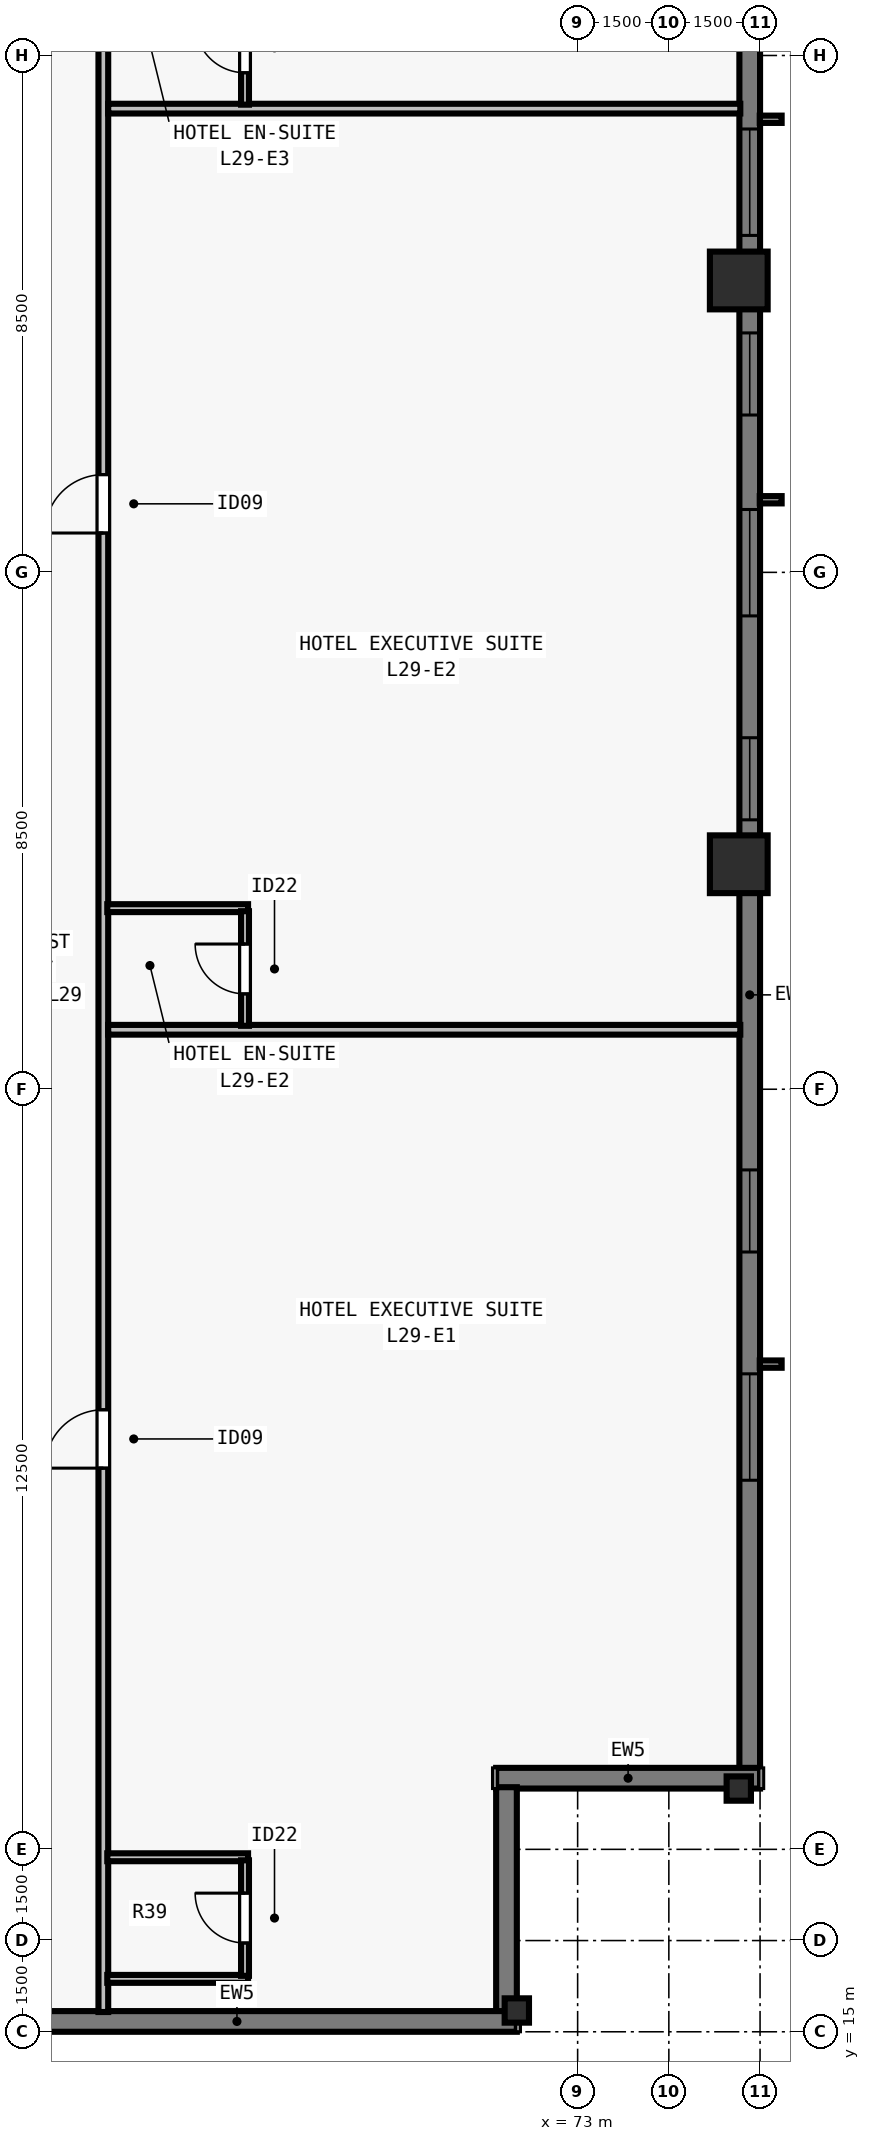
"""IFC4 building model, lengths in metres.
Left out: names, types, materials, properties, quantities, classifications, styles, units other than length and angle.
Written with IfcOpenShell. Run it as: python <this file> out.ifc"""

import sys

from ifc_helpers import new_model, si_unit, direction, frame, frame_2d, origin, origin_2d, place, context, subcontext, project, spatial, rectangle, i_section, extrude, element, fill, save


model = new_model("IFC4")
c1 = context("Model", 3, precision=1e-05, world=origin(), true_north=direction((0.0, 1.0)))
c2 = subcontext(c1, "Body", "Model", "MODEL_VIEW")
j1 = project(units=[si_unit("LENGTHUNIT", "METRE"), si_unit("PLANEANGLEUNIT", "RADIAN")], contexts=[c1])
p1 = place(None, origin())
s1 = spatial("IfcSite", under=j1, at=p1, CompositionType="ELEMENT")
p2 = place(p1, origin())
s2 = spatial("IfcBuilding", under=s1, at=p2, CompositionType="ELEMENT")
p3 = place(p2, frame((0.0, 0.0, 109.5)))
s3 = spatial("IfcBuildingStorey", under=s2, at=p3, CompositionType="ELEMENT", Elevation=109.5)
for number, where, z_axis, x_axis in (
    (1, (72.0, 15.35, 0.0), (0.0, 0.0, 1.0), (1.0, 0.0, 0.0)),
    (2, (75.65, 19.0, 0.0), (0.0, 0.0, 1.0), (0.0, 1.0, 0.0)),
):
    element("IfcColumn", number, at=place(p3, frame(where, z_axis=z_axis, x_axis=x_axis)), inside=s3, PredefinedType="COLUMN", context=c2, shape_type="SweptSolid", body=[
        extrude(i_section(OverallWidth=0.4, OverallDepth=0.4, WebThickness=0.022, FlangeThickness=0.036, at=origin_2d()), origin(), (0.0, 0.0, 1.0), 3.5),
    ])
for number, where, z_axis, x_axis in (
    (3, (75.65, 34.2, 0.0), (0.0, 0.0, 1.0), (0.0, 1.0, 0.0)),
    (4, (75.65, 43.8, 0.0), (0.0, 0.0, 1.0), (0.0, 1.0, 0.0)),
):
    element("IfcColumn", number, at=place(p3, frame(where, z_axis=z_axis, x_axis=x_axis)), inside=s3, PredefinedType="COLUMN", context=c2, shape_type="SweptSolid", body=[
        extrude(rectangle(XDim=0.95, YDim=0.95, at=origin_2d()), origin(), (0.0, 0.0, 1.0), 3.5),
    ])
p4 = place(p3, frame((75.83, 59.0, 0.0), z_axis=(0.0, 0.0, 1.0), x_axis=(0.0, -1.0, 0.0)))
e5 = element("IfcWall", 5, at=p4, inside=s3, PredefinedType="SOLIDWALL", context=c2, shape_type="SweptSolid", body=[
    extrude(rectangle(XDim=39.682, YDim=0.34, at=frame_2d((19.841, 0.0))), origin(), (0.0, 0.0, 1.0), 3.28),
])
p5 = place(p4, frame((4.752, 0.0, 0.8)))
e6 = element("IfcOpeningElement", 6, at=p5, cuts=e5, PredefinedType="OPENING", context=c2, shape_type="SweptSolid", body=[
    extrude(rectangle(XDim=1.75, YDim=1.66, at=frame_2d((0.875, 0.83))), frame((0.0, 0.18, 0.0), z_axis=(0.0, -1.0, 0.0), x_axis=(1.0, 0.0, 0.0)), (0.0, 0.0, 1.0), 0.36),
])
p6 = place(p4, frame((8.505, 0.0, 0.8)))
e7 = element("IfcOpeningElement", 7, at=p6, cuts=e5, PredefinedType="OPENING", context=c2, shape_type="SweptSolid", body=[
    extrude(rectangle(XDim=1.35, YDim=1.66, at=frame_2d((0.675, 0.83))), frame((0.0, 0.18, 0.0), z_axis=(0.0, -1.0, 0.0), x_axis=(1.0, 0.0, 0.0)), (0.0, 0.0, 1.0), 0.36),
])
p7 = place(p4, frame((12.709, 0.0, 0.8)))
e8 = element("IfcOpeningElement", 8, at=p7, cuts=e5, PredefinedType="OPENING", context=c2, shape_type="SweptSolid", body=[
    extrude(rectangle(XDim=1.75, YDim=1.66, at=frame_2d((0.875, 0.83))), frame((0.0, 0.18, 0.0), z_axis=(0.0, -1.0, 0.0), x_axis=(1.0, 0.0, 0.0)), (0.0, 0.0, 1.0), 0.36),
])
p8 = place(p4, frame((16.062, 0.0, 0.8)))
e9 = element("IfcOpeningElement", 9, at=p8, cuts=e5, PredefinedType="OPENING", context=c2, shape_type="SweptSolid", body=[
    extrude(rectangle(XDim=1.35, YDim=1.66, at=frame_2d((0.675, 0.83))), frame((0.0, 0.18, 0.0), z_axis=(0.0, -1.0, 0.0), x_axis=(1.0, 0.0, 0.0)), (0.0, 0.0, 1.0), 0.36),
])
p9 = place(p4, frame((18.966, 0.0, 0.8)))
e10 = element("IfcOpeningElement", 10, at=p9, cuts=e5, PredefinedType="OPENING", context=c2, shape_type="SweptSolid", body=[
    extrude(rectangle(XDim=1.75, YDim=1.66, at=frame_2d((0.875, 0.83))), frame((0.0, 0.18, 0.0), z_axis=(0.0, -1.0, 0.0), x_axis=(1.0, 0.0, 0.0)), (0.0, 0.0, 1.0), 0.36),
])
p10 = place(p4, frame((22.719, 0.0, 0.8)))
e11 = element("IfcOpeningElement", 11, at=p10, cuts=e5, PredefinedType="OPENING", context=c2, shape_type="SweptSolid", body=[
    extrude(rectangle(XDim=1.35, YDim=1.66, at=frame_2d((0.675, 0.83))), frame((0.0, 0.18, 0.0), z_axis=(0.0, -1.0, 0.0), x_axis=(1.0, 0.0, 0.0)), (0.0, 0.0, 1.0), 0.36),
])
p11 = place(p4, frame((29.827, 0.0, 0.8)))
e12 = element("IfcOpeningElement", 12, at=p11, cuts=e5, PredefinedType="OPENING", context=c2, shape_type="SweptSolid", body=[
    extrude(rectangle(XDim=1.35, YDim=1.66, at=frame_2d((0.675, 0.83))), frame((0.0, 0.18, 0.0), z_axis=(0.0, -1.0, 0.0), x_axis=(1.0, 0.0, 0.0)), (0.0, 0.0, 1.0), 0.36),
])
p12 = place(p4, frame((33.18, 0.0, 0.8)))
e13 = element("IfcOpeningElement", 13, at=p12, cuts=e5, PredefinedType="OPENING", context=c2, shape_type="SweptSolid", body=[
    extrude(rectangle(XDim=1.75, YDim=1.66, at=frame_2d((0.875, 0.83))), frame((0.0, 0.18, 0.0), z_axis=(0.0, -1.0, 0.0), x_axis=(1.0, 0.0, 0.0)), (0.0, 0.0, 1.0), 0.36),
])
p13 = place(p3, frame((76.0, 19.17, 0.0), z_axis=(0.0, 0.0, 1.0), x_axis=(-1.0, 0.0, 0.0)))
e14 = element("IfcWall", 14, at=p13, inside=s3, PredefinedType="SOLIDWALL", context=c2, shape_type="SweptSolid", body=[
    extrude(rectangle(XDim=4.34, YDim=0.34, at=frame_2d((2.17, 0.0))), origin(), (0.0, 0.0, 1.0), 3.28),
])
p14 = place(p3, frame((71.83, 19.022, 0.0), z_axis=(0.0, 0.0, 1.0), x_axis=(0.0, -1.0, 0.0)))
e15 = element("IfcWall", 15, at=p14, inside=s3, PredefinedType="SOLIDWALL", context=c2, shape_type="SweptSolid", body=[
    extrude(rectangle(XDim=3.704, YDim=0.34, at=frame_2d((1.852, 0.0))), origin(), (0.0, 0.0, 1.0), 3.28),
])
p15 = place(p3, frame((72.0, 15.17, 0.0), z_axis=(0.0, 0.0, 1.0), x_axis=(-1.0, 0.0, 0.0)))
e16 = element("IfcWall", 16, at=p15, inside=s3, PredefinedType="SOLIDWALL", context=c2, shape_type="SweptSolid", body=[
    extrude(rectangle(XDim=39.682, YDim=0.34, at=frame_2d((19.841, 0.0))), origin(), (0.0, 0.0, 1.0), 3.28),
])
p16 = place(p15, frame((9.355, 0.0, 0.8)))
e17 = element("IfcOpeningElement", 17, at=p16, cuts=e16, PredefinedType="OPENING", context=c2, shape_type="SweptSolid", body=[
    extrude(rectangle(XDim=1.35, YDim=1.66, at=frame_2d((0.675, 0.83))), frame((0.0, 0.18, 0.0), z_axis=(0.0, -1.0, 0.0), x_axis=(1.0, 0.0, 0.0)), (0.0, 0.0, 1.0), 0.36),
])
p17 = place(p15, frame((11.859, 0.0, 0.8)))
e18 = element("IfcOpeningElement", 18, at=p17, cuts=e16, PredefinedType="OPENING", context=c2, shape_type="SweptSolid", body=[
    extrude(rectangle(XDim=1.75, YDim=1.66, at=frame_2d((0.875, 0.83))), frame((0.0, 0.18, 0.0), z_axis=(0.0, -1.0, 0.0), x_axis=(1.0, 0.0, 0.0)), (0.0, 0.0, 1.0), 0.36),
])
p18 = place(p15, frame((16.062, 0.0, 0.8)))
e19 = element("IfcOpeningElement", 19, at=p18, cuts=e16, PredefinedType="OPENING", context=c2, shape_type="SweptSolid", body=[
    extrude(rectangle(XDim=1.35, YDim=1.66, at=frame_2d((0.675, 0.83))), frame((0.0, 0.18, 0.0), z_axis=(0.0, -1.0, 0.0), x_axis=(1.0, 0.0, 0.0)), (0.0, 0.0, 1.0), 0.36),
])
p19 = place(p15, frame((18.116, 0.0, 0.8)))
e20 = element("IfcOpeningElement", 20, at=p19, cuts=e16, PredefinedType="OPENING", context=c2, shape_type="SweptSolid", body=[
    extrude(rectangle(XDim=1.75, YDim=1.66, at=frame_2d((0.875, 0.83))), frame((0.0, 0.18, 0.0), z_axis=(0.0, -1.0, 0.0), x_axis=(1.0, 0.0, 0.0)), (0.0, 0.0, 1.0), 0.36),
])
p20 = place(p15, frame((22.719, 0.0, 0.8)))
e21 = element("IfcOpeningElement", 21, at=p20, cuts=e16, PredefinedType="OPENING", context=c2, shape_type="SweptSolid", body=[
    extrude(rectangle(XDim=1.35, YDim=1.66, at=frame_2d((0.675, 0.83))), frame((0.0, 0.18, 0.0), z_axis=(0.0, -1.0, 0.0), x_axis=(1.0, 0.0, 0.0)), (0.0, 0.0, 1.0), 0.36),
])
p21 = place(p15, frame((26.073, 0.0, 0.8)))
e22 = element("IfcOpeningElement", 22, at=p21, cuts=e16, PredefinedType="OPENING", context=c2, shape_type="SweptSolid", body=[
    extrude(rectangle(XDim=1.75, YDim=1.66, at=frame_2d((0.875, 0.83))), frame((0.0, 0.18, 0.0), z_axis=(0.0, -1.0, 0.0), x_axis=(1.0, 0.0, 0.0)), (0.0, 0.0, 1.0), 0.36),
])
p22 = place(p15, frame((29.377, 0.0, 0.8)))
e23 = element("IfcOpeningElement", 23, at=p22, cuts=e16, PredefinedType="OPENING", context=c2, shape_type="SweptSolid", body=[
    extrude(rectangle(XDim=1.35, YDim=1.66, at=frame_2d((0.675, 0.83))), frame((0.0, 0.18, 0.0), z_axis=(0.0, -1.0, 0.0), x_axis=(1.0, 0.0, 0.0)), (0.0, 0.0, 1.0), 0.36),
])
p23 = place(p3, frame((65.2, 15.325, 0.0), z_axis=(0.0, 0.0, 1.0), x_axis=(0.0, 1.0, 0.0)))
e24 = element("IfcWall", 24, at=p23, inside=s3, PredefinedType="PARTITIONING", context=c2, shape_type="SweptSolid", body=[
    extrude(rectangle(XDim=47.35, YDim=0.16, at=frame_2d((23.675, 0.0))), origin(), (0.0, 0.0, 1.0), 2.555),
])
p24 = place(p23, frame((8.944, 0.0, 0.0)))
e25 = element("IfcOpeningElement", 25, at=p24, cuts=e24, PredefinedType="OPENING", context=c2, shape_type="SweptSolid", body=[
    extrude(rectangle(XDim=0.96, YDim=2.15, at=frame_2d((0.48, 1.075))), frame((0.0, 0.09, 0.0), z_axis=(0.0, -1.0, 0.0), x_axis=(1.0, 0.0, 0.0)), (0.0, 0.0, 1.0), 0.18),
])
p25 = place(p23, frame((24.322, 0.0, 0.0)))
e26 = element("IfcOpeningElement", 26, at=p25, cuts=e24, PredefinedType="OPENING", context=c2, shape_type="SweptSolid", body=[
    extrude(rectangle(XDim=0.96, YDim=2.15, at=frame_2d((0.48, 1.075))), frame((0.0, 0.09, 0.0), z_axis=(0.0, -1.0, 0.0), x_axis=(1.0, 0.0, 0.0)), (0.0, 0.0, 1.0), 0.18),
])
p26 = place(p23, frame((39.873, 0.0, 0.0)))
e27 = element("IfcOpeningElement", 27, at=p26, cuts=e24, PredefinedType="OPENING", context=c2, shape_type="SweptSolid", body=[
    extrude(rectangle(XDim=0.96, YDim=2.15, at=frame_2d((0.48, 1.075))), frame((0.0, 0.09, 0.0), z_axis=(0.0, -1.0, 0.0), x_axis=(1.0, 0.0, 0.0)), (0.0, 0.0, 1.0), 0.18),
])
for number, where, z_axis, x_axis in (
    (28, (65.265, 15.87, 0.0), (0.0, 0.0, 1.0), (1.0, 0.0, 0.0)),
    (29, (65.265, 17.87, 0.0), (0.0, 0.0, 1.0), (1.0, 0.0, 0.0)),
):
    element("IfcWall", number, at=place(p3, frame(where, z_axis=z_axis, x_axis=x_axis)), inside=s3, PredefinedType="PLUMBINGWALL", context=c2, shape_type="SweptSolid", body=[
        extrude(rectangle(XDim=2.315, YDim=0.13, at=frame_2d((1.158, 0.0))), origin(), (0.0, 0.0, 1.0), 3.28),
    ])
p27 = place(p3, frame((67.53, 15.92, 0.0), z_axis=(0.0, 0.0, 1.0), x_axis=(0.0, 1.0, 0.0)))
e30 = element("IfcWall", 30, at=p27, inside=s3, PredefinedType="PLUMBINGWALL", context=c2, shape_type="SweptSolid", body=[
    extrude(rectangle(XDim=1.9, YDim=0.13, at=frame_2d((0.95, 0.0))), origin(), (0.0, 0.0, 1.0), 3.28),
])
p28 = place(p27, frame((0.54, 0.0, 0.0)))
e31 = element("IfcOpeningElement", 31, at=p28, cuts=e30, PredefinedType="OPENING", context=c2, shape_type="SweptSolid", body=[
    extrude(rectangle(XDim=0.82, YDim=2.1, at=frame_2d((0.41, 1.05))), frame((0.0, 0.075, 0.0), z_axis=(0.0, -1.0, 0.0), x_axis=(1.0, 0.0, 0.0)), (0.0, 0.0, 1.0), 0.15),
])
p29 = place(p3, frame((65.28, 31.478, 0.0), z_axis=(0.0, 0.0, 1.0), x_axis=(1.0, 0.0, 0.0)))
e32 = element("IfcWall", 32, at=p29, inside=s3, PredefinedType="PARTITIONING", context=c2, shape_type="SweptSolid", body=[
    extrude(rectangle(XDim=10.395, YDim=0.16, at=frame_2d((5.198, 0.0))), origin(), (0.0, 0.0, 1.0), 3.28),
])
p30 = place(p3, frame((65.265, 33.478, 0.0), z_axis=(0.0, 0.0, 1.0), x_axis=(1.0, 0.0, 0.0)))
e33 = element("IfcWall", 33, at=p30, inside=s3, PredefinedType="PLUMBINGWALL", context=c2, shape_type="SweptSolid", body=[
    extrude(rectangle(XDim=2.315, YDim=0.13, at=frame_2d((1.158, 0.0))), origin(), (0.0, 0.0, 1.0), 3.28),
])
p31 = place(p3, frame((67.53, 31.543, 0.0), z_axis=(0.0, 0.0, 1.0), x_axis=(0.0, 1.0, 0.0)))
e34 = element("IfcWall", 34, at=p31, inside=s3, PredefinedType="PLUMBINGWALL", context=c2, shape_type="SweptSolid", body=[
    extrude(rectangle(XDim=1.885, YDim=0.13, at=frame_2d((0.942, 0.0))), origin(), (0.0, 0.0, 1.0), 3.28),
])
p32 = place(p31, frame((0.525, 0.0, 0.0)))
e35 = element("IfcOpeningElement", 35, at=p32, cuts=e34, PredefinedType="OPENING", context=c2, shape_type="SweptSolid", body=[
    extrude(rectangle(XDim=0.82, YDim=2.1, at=frame_2d((0.41, 1.05))), frame((0.0, 0.075, 0.0), z_axis=(0.0, -1.0, 0.0), x_axis=(1.0, 0.0, 0.0)), (0.0, 0.0, 1.0), 0.15),
])
p33 = place(p3, frame((65.28, 46.626, 0.0), z_axis=(0.0, 0.0, 1.0), x_axis=(1.0, 0.0, 0.0)))
e36 = element("IfcWall", 36, at=p33, inside=s3, PredefinedType="PARTITIONING", context=c2, shape_type="SweptSolid", body=[
    extrude(rectangle(XDim=10.395, YDim=0.16, at=frame_2d((5.198, 0.0))), origin(), (0.0, 0.0, 1.0), 3.28),
])
p34 = place(p3, frame((67.53, 46.691, 0.0), z_axis=(0.0, 0.0, 1.0), x_axis=(0.0, 1.0, 0.0)))
e37 = element("IfcWall", 37, at=p34, inside=s3, PredefinedType="PLUMBINGWALL", context=c2, shape_type="SweptSolid", body=[
    extrude(rectangle(XDim=1.885, YDim=0.13, at=frame_2d((0.942, 0.0))), origin(), (0.0, 0.0, 1.0), 3.28),
])
p35 = place(p34, frame((0.525, 0.0, 0.0)))
e38 = element("IfcOpeningElement", 38, at=p35, cuts=e37, PredefinedType="OPENING", context=c2, shape_type="SweptSolid", body=[
    extrude(rectangle(XDim=0.82, YDim=2.1, at=frame_2d((0.41, 1.05))), frame((0.0, 0.075, 0.0), z_axis=(0.0, -1.0, 0.0), x_axis=(1.0, 0.0, 0.0)), (0.0, 0.0, 1.0), 0.15),
])
p36 = place(p7, origin())
e39 = element("IfcWindow", 39, at=p36, inside=s3, PartitioningType="SINGLE_PANEL", PredefinedType="WINDOW", context=c2, shape_type="SweptSolid", body=[
    extrude(rectangle(XDim=1.75, YDim=1.66, at=frame_2d((0.875, 0.83))), frame((0.0, -0.05, 0.0), z_axis=(0.0, -1.0, 0.0), x_axis=(1.0, 0.0, 0.0)), (0.0, 0.0, 1.0), 0.06),
])
fill(e8, e39)
p37 = place(p8, origin())
e40 = element("IfcWindow", 40, at=p37, inside=s3, PartitioningType="SINGLE_PANEL", PredefinedType="WINDOW", context=c2, shape_type="SweptSolid", body=[
    extrude(rectangle(XDim=1.35, YDim=1.66, at=frame_2d((0.675, 0.83))), frame((0.0, -0.05, 0.0), z_axis=(0.0, -1.0, 0.0), x_axis=(1.0, 0.0, 0.0)), (0.0, 0.0, 1.0), 0.06),
])
fill(e9, e40)
p38 = place(p9, origin())
e41 = element("IfcWindow", 41, at=p38, inside=s3, PartitioningType="SINGLE_PANEL", PredefinedType="WINDOW", context=c2, shape_type="SweptSolid", body=[
    extrude(rectangle(XDim=1.75, YDim=1.66, at=frame_2d((0.875, 0.83))), frame((0.0, -0.05, 0.0), z_axis=(0.0, -1.0, 0.0), x_axis=(1.0, 0.0, 0.0)), (0.0, 0.0, 1.0), 0.06),
])
fill(e10, e41)
p39 = place(p10, origin())
e42 = element("IfcWindow", 42, at=p39, inside=s3, PartitioningType="SINGLE_PANEL", PredefinedType="WINDOW", context=c2, shape_type="SweptSolid", body=[
    extrude(rectangle(XDim=1.35, YDim=1.66, at=frame_2d((0.675, 0.83))), frame((0.0, -0.05, 0.0), z_axis=(0.0, -1.0, 0.0), x_axis=(1.0, 0.0, 0.0)), (0.0, 0.0, 1.0), 0.06),
])
fill(e11, e42)
p40 = place(p11, origin())
e43 = element("IfcWindow", 43, at=p40, inside=s3, PartitioningType="SINGLE_PANEL", PredefinedType="WINDOW", context=c2, shape_type="SweptSolid", body=[
    extrude(rectangle(XDim=1.35, YDim=1.66, at=frame_2d((0.675, 0.83))), frame((0.0, -0.05, 0.0), z_axis=(0.0, -1.0, 0.0), x_axis=(1.0, 0.0, 0.0)), (0.0, 0.0, 1.0), 0.06),
])
fill(e12, e43)
p41 = place(p12, origin())
e44 = element("IfcWindow", 44, at=p41, inside=s3, PartitioningType="SINGLE_PANEL", PredefinedType="WINDOW", context=c2, shape_type="SweptSolid", body=[
    extrude(rectangle(XDim=1.75, YDim=1.66, at=frame_2d((0.875, 0.83))), frame((0.0, -0.05, 0.0), z_axis=(0.0, -1.0, 0.0), x_axis=(1.0, 0.0, 0.0)), (0.0, 0.0, 1.0), 0.06),
])
fill(e13, e44)
p42 = place(p28, origin())
e45 = element("IfcDoor", 45, at=p42, inside=s3, OperationType="SINGLE_SWING_RIGHT", PredefinedType="DOOR", context=c2, shape_type="SweptSolid", body=[
    extrude(rectangle(XDim=0.82, YDim=2.1, at=frame_2d((0.41, 1.05))), frame((0.0, 0.025, 0.0), z_axis=(0.0, -1.0, 0.0), x_axis=(1.0, 0.0, 0.0)), (0.0, 0.0, 1.0), 0.05),
])
fill(e31, e45)
p43 = place(p24, origin())
e46 = element("IfcDoor", 46, at=p43, inside=s3, OperationType="SINGLE_SWING_LEFT", PredefinedType="DOOR", context=c2, shape_type="SweptSolid", body=[
    extrude(rectangle(XDim=0.96, YDim=2.15, at=frame_2d((0.48, 1.075))), frame((0.0, 0.025, 0.0), z_axis=(0.0, -1.0, 0.0), x_axis=(1.0, 0.0, 0.0)), (0.0, 0.0, 1.0), 0.05),
])
fill(e25, e46)
p44 = place(p32, origin())
e47 = element("IfcDoor", 47, at=p44, inside=s3, OperationType="SINGLE_SWING_RIGHT", PredefinedType="DOOR", context=c2, shape_type="SweptSolid", body=[
    extrude(rectangle(XDim=0.82, YDim=2.1, at=frame_2d((0.41, 1.05))), frame((0.0, 0.025, 0.0), z_axis=(0.0, -1.0, 0.0), x_axis=(1.0, 0.0, 0.0)), (0.0, 0.0, 1.0), 0.05),
])
fill(e35, e47)
p45 = place(p25, origin())
e48 = element("IfcDoor", 48, at=p45, inside=s3, OperationType="SINGLE_SWING_LEFT", PredefinedType="DOOR", context=c2, shape_type="SweptSolid", body=[
    extrude(rectangle(XDim=0.96, YDim=2.15, at=frame_2d((0.48, 1.075))), frame((0.0, 0.025, 0.0), z_axis=(0.0, -1.0, 0.0), x_axis=(1.0, 0.0, 0.0)), (0.0, 0.0, 1.0), 0.05),
])
fill(e26, e48)
p46 = place(p35, origin())
e49 = element("IfcDoor", 49, at=p46, inside=s3, OperationType="SINGLE_SWING_RIGHT", PredefinedType="DOOR", context=c2, shape_type="SweptSolid", body=[
    extrude(rectangle(XDim=0.82, YDim=2.1, at=frame_2d((0.41, 1.05))), frame((0.0, 0.025, 0.0), z_axis=(0.0, -1.0, 0.0), x_axis=(1.0, 0.0, 0.0)), (0.0, 0.0, 1.0), 0.05),
])
fill(e38, e49)
save(model, sys.argv[1])
